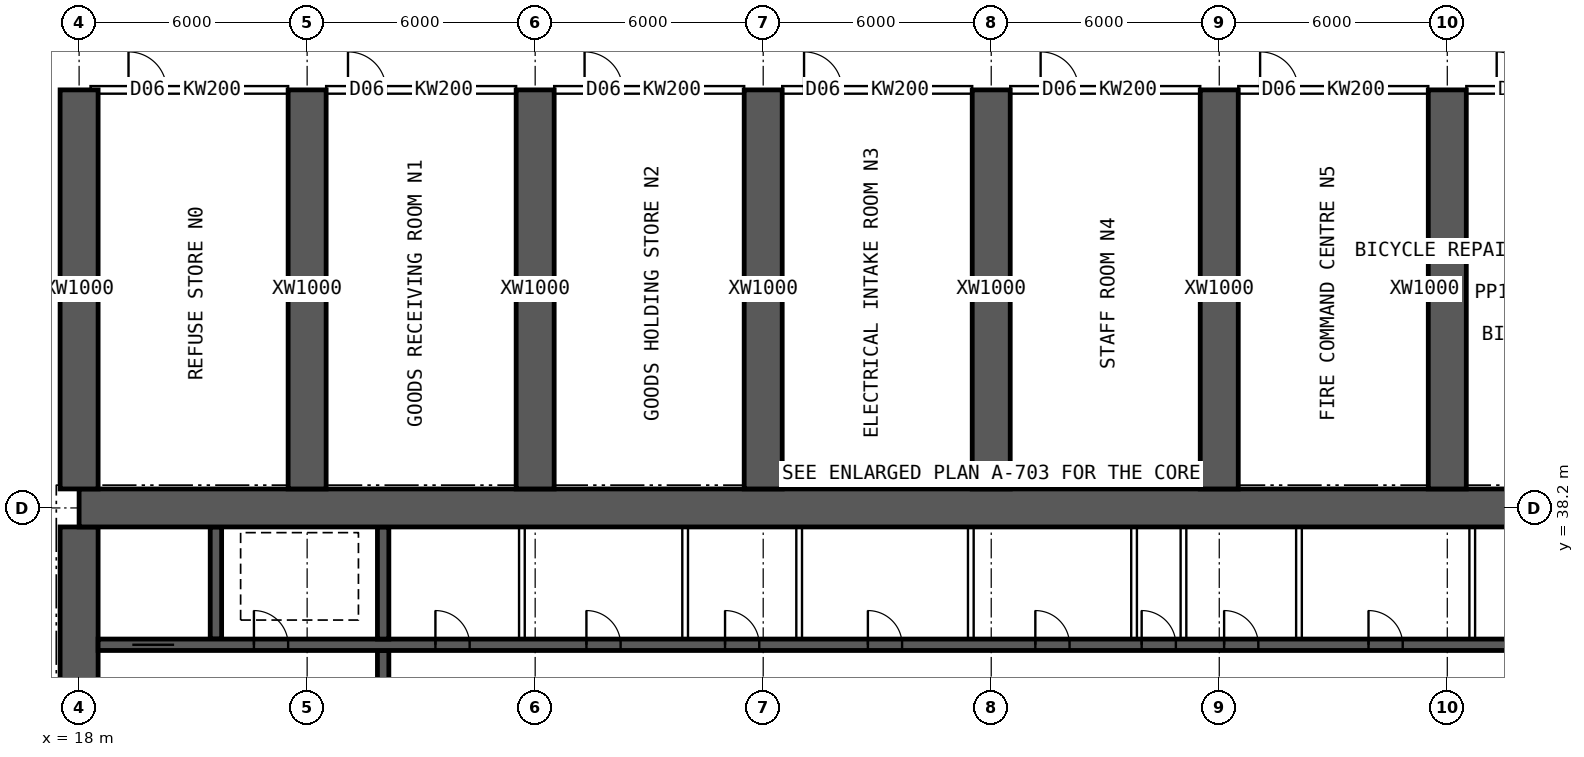
"""IFC4 building model, lengths in metres.
Left out: names, types, materials, properties, quantities, classifications, styles, units other than length and angle.
Written with IfcOpenShell. Run it as: python <this file> out.ifc"""

import sys

from ifc_helpers import new_model, si_unit, direction, frame, frame_2d, origin, place, context, subcontext, project, spatial, rectangle, extrude, element, fill, save


model = new_model("IFC4")
c1 = context("Model", 3, precision=1e-05, world=origin(), true_north=direction((0.0, 1.0)))
c2 = subcontext(c1, "Body", "Model", "MODEL_VIEW")
j1 = project(units=[si_unit("LENGTHUNIT", "METRE"), si_unit("PLANEANGLEUNIT", "RADIAN")], contexts=[c1])
p1 = place(None, origin())
s1 = spatial("IfcSite", under=j1, at=p1, CompositionType="ELEMENT")
p2 = place(p1, origin())
s2 = spatial("IfcBuilding", under=s1, at=p2, CompositionType="ELEMENT")
p3 = place(p2, origin())
s3 = spatial("IfcBuildingStorey", under=s2, at=p3, CompositionType="ELEMENT", Elevation=0.0)
p4 = place(p3, frame((18.0, 38.2, 0.0), z_axis=(0.0, 0.0, 1.0), x_axis=(1.0, 0.0, 0.0)))
e1 = element("IfcWall", 1, at=p4, inside=s3, PredefinedType="SHEAR", context=c2, shape_type="SweptSolid", body=[
    extrude(rectangle(XDim=48.0, YDim=1.0, at=frame_2d((24.0, 0.0))), origin(), (0.0, 0.0, 1.0), 6.0),
])
p5 = place(p3, frame((18.0, 26.3, 0.0), z_axis=(0.0, 0.0, 1.0), x_axis=(0.0, 1.0, 0.0)))
e2 = element("IfcWall", 2, at=p5, inside=s3, PredefinedType="SHEAR", context=c2, shape_type="SweptSolid", body=[
    extrude(rectangle(XDim=11.4, YDim=1.0, at=frame_2d((5.7, 0.0))), origin(), (0.0, 0.0, 1.0), 6.0),
])
p6 = place(p5, frame((5.0, 0.0, 0.0)))
e3 = element("IfcOpeningElement", 3, at=p6, cuts=e2, PredefinedType="OPENING", context=c2, shape_type="SweptSolid", body=[
    extrude(rectangle(XDim=1.2, YDim=2.1, at=frame_2d((0.6, 1.05))), frame((0.0, 0.51, 0.0), z_axis=(0.0, -1.0, 0.0), x_axis=(1.0, 0.0, 0.0)), (0.0, 0.0, 1.0), 1.02),
])
p7 = place(p3, frame((18.5, 34.6, 0.0), z_axis=(0.0, 0.0, 1.0), x_axis=(1.0, 0.0, 0.0)))
e4 = element("IfcWall", 4, at=p7, inside=s3, PredefinedType="SHEAR", context=c2, shape_type="SweptSolid", body=[
    extrude(rectangle(XDim=47.0, YDim=0.3, at=frame_2d((23.5, 0.0))), origin(), (0.0, 0.0, 1.0), 6.0),
])
p8 = place(p7, frame((0.9, 0.0, 0.0)))
e5 = element("IfcOpeningElement", 5, at=p8, cuts=e4, PredefinedType="OPENING", context=c2, shape_type="SweptSolid", body=[
    extrude(rectangle(XDim=1.1, YDim=2.1, at=frame_2d((0.55, 1.05))), frame((0.0, 0.16, 0.0), z_axis=(0.0, -1.0, 0.0), x_axis=(1.0, 0.0, 0.0)), (0.0, 0.0, 1.0), 0.32),
])
p9 = place(p7, frame((45.0, 0.0, 0.0)))
e6 = element("IfcOpeningElement", 6, at=p9, cuts=e4, PredefinedType="OPENING", context=c2, shape_type="SweptSolid", body=[
    extrude(rectangle(XDim=1.1, YDim=2.1, at=frame_2d((0.55, 1.05))), frame((0.0, 0.16, 0.0), z_axis=(0.0, -1.0, 0.0), x_axis=(1.0, 0.0, 0.0)), (0.0, 0.0, 1.0), 0.32),
])
p10 = place(p7, frame((4.1, 0.0, 0.0)))
e7 = element("IfcOpeningElement", 7, at=p10, cuts=e4, PredefinedType="OPENING", context=c2, shape_type="SweptSolid", body=[
    extrude(rectangle(XDim=0.9, YDim=2.1, at=frame_2d((0.45, 1.05))), frame((0.0, 0.16, 0.0), z_axis=(0.0, -1.0, 0.0), x_axis=(1.0, 0.0, 0.0)), (0.0, 0.0, 1.0), 0.32),
])
p11 = place(p7, frame((42.0, 0.0, 0.0)))
e8 = element("IfcOpeningElement", 8, at=p11, cuts=e4, PredefinedType="OPENING", context=c2, shape_type="SweptSolid", body=[
    extrude(rectangle(XDim=0.9, YDim=2.1, at=frame_2d((0.45, 1.05))), frame((0.0, 0.16, 0.0), z_axis=(0.0, -1.0, 0.0), x_axis=(1.0, 0.0, 0.0)), (0.0, 0.0, 1.0), 0.32),
])
p12 = place(p7, frame((8.875, 0.0, 0.0)))
e9 = element("IfcOpeningElement", 9, at=p12, cuts=e4, PredefinedType="OPENING", context=c2, shape_type="SweptSolid", body=[
    extrude(rectangle(XDim=0.9, YDim=2.1, at=frame_2d((0.45, 1.05))), frame((0.0, 0.16, 0.0), z_axis=(0.0, -1.0, 0.0), x_axis=(1.0, 0.0, 0.0)), (0.0, 0.0, 1.0), 0.32),
])
p13 = place(p7, frame((12.849, 0.0, 0.0)))
e10 = element("IfcOpeningElement", 10, at=p13, cuts=e4, PredefinedType="OPENING", context=c2, shape_type="SweptSolid", body=[
    extrude(rectangle(XDim=0.9, YDim=2.1, at=frame_2d((0.45, 1.05))), frame((0.0, 0.16, 0.0), z_axis=(0.0, -1.0, 0.0), x_axis=(1.0, 0.0, 0.0)), (0.0, 0.0, 1.0), 0.32),
])
p14 = place(p7, frame((16.496, 0.0, 0.0)))
e11 = element("IfcOpeningElement", 11, at=p14, cuts=e4, PredefinedType="OPENING", context=c2, shape_type="SweptSolid", body=[
    extrude(rectangle(XDim=0.9, YDim=2.1, at=frame_2d((0.45, 1.05))), frame((0.0, 0.16, 0.0), z_axis=(0.0, -1.0, 0.0), x_axis=(1.0, 0.0, 0.0)), (0.0, 0.0, 1.0), 0.32),
])
p15 = place(p7, frame((20.255, 0.0, 0.0)))
e12 = element("IfcOpeningElement", 12, at=p15, cuts=e4, PredefinedType="OPENING", context=c2, shape_type="SweptSolid", body=[
    extrude(rectangle(XDim=0.9, YDim=2.1, at=frame_2d((0.45, 1.05))), frame((0.0, 0.16, 0.0), z_axis=(0.0, -1.0, 0.0), x_axis=(1.0, 0.0, 0.0)), (0.0, 0.0, 1.0), 0.32),
])
p16 = place(p7, frame((24.661, 0.0, 0.0)))
e13 = element("IfcOpeningElement", 13, at=p16, cuts=e4, PredefinedType="OPENING", context=c2, shape_type="SweptSolid", body=[
    extrude(rectangle(XDim=0.9, YDim=2.1, at=frame_2d((0.45, 1.05))), frame((0.0, 0.16, 0.0), z_axis=(0.0, -1.0, 0.0), x_axis=(1.0, 0.0, 0.0)), (0.0, 0.0, 1.0), 0.32),
])
p17 = place(p7, frame((27.458, 0.0, 0.0)))
e14 = element("IfcOpeningElement", 14, at=p17, cuts=e4, PredefinedType="OPENING", context=c2, shape_type="SweptSolid", body=[
    extrude(rectangle(XDim=0.9, YDim=2.1, at=frame_2d((0.45, 1.05))), frame((0.0, 0.16, 0.0), z_axis=(0.0, -1.0, 0.0), x_axis=(1.0, 0.0, 0.0)), (0.0, 0.0, 1.0), 0.32),
])
p18 = place(p7, frame((29.628, 0.0, 0.0)))
e15 = element("IfcOpeningElement", 15, at=p18, cuts=e4, PredefinedType="OPENING", context=c2, shape_type="SweptSolid", body=[
    extrude(rectangle(XDim=0.9, YDim=2.1, at=frame_2d((0.45, 1.05))), frame((0.0, 0.16, 0.0), z_axis=(0.0, -1.0, 0.0), x_axis=(1.0, 0.0, 0.0)), (0.0, 0.0, 1.0), 0.32),
])
p19 = place(p7, frame((33.427, 0.0, 0.0)))
e16 = element("IfcOpeningElement", 16, at=p19, cuts=e4, PredefinedType="OPENING", context=c2, shape_type="SweptSolid", body=[
    extrude(rectangle(XDim=0.9, YDim=2.1, at=frame_2d((0.45, 1.05))), frame((0.0, 0.16, 0.0), z_axis=(0.0, -1.0, 0.0), x_axis=(1.0, 0.0, 0.0)), (0.0, 0.0, 1.0), 0.32),
])
p20 = place(p7, frame((37.378, 0.0, 0.0)))
e17 = element("IfcOpeningElement", 17, at=p20, cuts=e4, PredefinedType="OPENING", context=c2, shape_type="SweptSolid", body=[
    extrude(rectangle(XDim=0.9, YDim=2.1, at=frame_2d((0.45, 1.05))), frame((0.0, 0.16, 0.0), z_axis=(0.0, -1.0, 0.0), x_axis=(1.0, 0.0, 0.0)), (0.0, 0.0, 1.0), 0.32),
])
p21 = place(p3, frame((26.0, 30.55, 0.0), z_axis=(0.0, 0.0, 1.0), x_axis=(0.0, 1.0, 0.0)))
e18 = element("IfcWall", 18, at=p21, inside=s3, PredefinedType="SHEAR", context=c2, shape_type="SweptSolid", body=[
    extrude(rectangle(XDim=3.9, YDim=0.3, at=frame_2d((1.95, 0.0))), origin(), (0.0, 0.0, 1.0), 6.0),
])
p22 = place(p21, frame((1.4, 0.0, 0.0)))
e19 = element("IfcOpeningElement", 19, at=p22, cuts=e18, PredefinedType="OPENING", context=c2, shape_type="SweptSolid", body=[
    extrude(rectangle(XDim=1.2, YDim=2.1, at=frame_2d((0.6, 1.05))), frame((0.0, 0.16, 0.0), z_axis=(0.0, -1.0, 0.0), x_axis=(1.0, 0.0, 0.0)), (0.0, 0.0, 1.0), 0.32),
])
for number, where, z_axis, x_axis in (
    (20, (21.6, 34.75, 0.0), (0.0, 0.0, 1.0), (0.0, 1.0, 0.0)),
    (21, (26.0, 34.75, 0.0), (0.0, 0.0, 1.0), (0.0, 1.0, 0.0)),
):
    element("IfcWall", number, at=place(p3, frame(where, z_axis=z_axis, x_axis=x_axis)), inside=s3, PredefinedType="SHEAR", context=c2, shape_type="SweptSolid", body=[
        extrude(rectangle(XDim=2.95, YDim=0.3, at=frame_2d((1.475, 0.0))), origin(), (0.0, 0.0, 1.0), 6.0),
    ])
for number, where, z_axis, x_axis in (
    (22, (18.0, 38.7, 0.0), (0.0, 0.0, 1.0), (0.0, 1.0, 0.0)),
    (23, (24.0, 38.7, 0.0), (0.0, 0.0, 1.0), (0.0, 1.0, 0.0)),
    (24, (30.0, 38.7, 0.0), (0.0, 0.0, 1.0), (0.0, 1.0, 0.0)),
    (25, (36.0, 38.7, 0.0), (0.0, 0.0, 1.0), (0.0, 1.0, 0.0)),
    (26, (42.0, 38.7, 0.0), (0.0, 0.0, 1.0), (0.0, 1.0, 0.0)),
    (27, (48.0, 38.7, 0.0), (0.0, 0.0, 1.0), (0.0, 1.0, 0.0)),
    (28, (54.0, 38.7, 0.0), (0.0, 0.0, 1.0), (0.0, 1.0, 0.0)),
):
    element("IfcWall", number, at=place(p3, frame(where, z_axis=z_axis, x_axis=x_axis)), inside=s3, PredefinedType="SHEAR", context=c2, shape_type="SweptSolid", body=[
        extrude(rectangle(XDim=10.5, YDim=1.0, at=frame_2d((5.25, 0.0))), origin(), (0.0, 0.0, 1.0), 6.0),
    ])
for number, where, z_axis, x_axis in (
    (29, (29.651, 34.75, 0.0), (0.0, 0.0, 1.0), (0.0, 1.0, 0.0)),
    (30, (33.946, 34.75, 0.0), (0.0, 0.0, 1.0), (0.0, 1.0, 0.0)),
    (31, (36.946, 34.75, 0.0), (0.0, 0.0, 1.0), (0.0, 1.0, 0.0)),
    (32, (41.463, 34.75, 0.0), (0.0, 0.0, 1.0), (0.0, 1.0, 0.0)),
    (33, (45.758, 34.75, 0.0), (0.0, 0.0, 1.0), (0.0, 1.0, 0.0)),
    (34, (47.058, 34.75, 0.0), (0.0, 0.0, 1.0), (0.0, 1.0, 0.0)),
    (35, (50.098, 34.75, 0.0), (0.0, 0.0, 1.0), (0.0, 1.0, 0.0)),
    (36, (54.657, 34.75, 0.0), (0.0, 0.0, 1.0), (0.0, 1.0, 0.0)),
):
    element("IfcWall", number, at=place(p3, frame(where, z_axis=z_axis, x_axis=x_axis)), inside=s3, PredefinedType="SOLIDWALL", context=c2, shape_type="SweptSolid", body=[
        extrude(rectangle(XDim=2.95, YDim=0.15, at=frame_2d((1.475, 0.0))), origin(), (0.0, 0.0, 1.0), 5.65),
    ])
p23 = place(p3, frame((18.3, 49.2, 0.0), z_axis=(0.0, 0.0, 1.0), x_axis=(1.0, 0.0, 0.0)))
e37 = element("IfcWall", 37, at=p23, inside=s3, PredefinedType="SOLIDWALL", context=c2, shape_type="SweptSolid", body=[
    extrude(rectangle(XDim=5.2, YDim=0.2, at=frame_2d((2.6, 0.0))), origin(), (0.0, 0.0, 1.0), 5.65),
])
p24 = place(p23, frame((1.0, 0.0, 0.0)))
e38 = element("IfcOpeningElement", 38, at=p24, cuts=e37, PredefinedType="OPENING", context=c2, shape_type="SweptSolid", body=[
    extrude(rectangle(XDim=1.0, YDim=2.1, at=frame_2d((0.5, 1.05))), frame((0.0, 0.11, 0.0), z_axis=(0.0, -1.0, 0.0), x_axis=(1.0, 0.0, 0.0)), (0.0, 0.0, 1.0), 0.22),
])
p25 = place(p3, frame((24.5, 49.2, 0.0), z_axis=(0.0, 0.0, 1.0), x_axis=(1.0, 0.0, 0.0)))
e39 = element("IfcWall", 39, at=p25, inside=s3, PredefinedType="SOLIDWALL", context=c2, shape_type="SweptSolid", body=[
    extrude(rectangle(XDim=5.0, YDim=0.2, at=frame_2d((2.5, 0.0))), origin(), (0.0, 0.0, 1.0), 5.65),
])
p26 = place(p25, frame((0.575, 0.0, 0.0)))
e40 = element("IfcOpeningElement", 40, at=p26, cuts=e39, PredefinedType="OPENING", context=c2, shape_type="SweptSolid", body=[
    extrude(rectangle(XDim=1.0, YDim=2.1, at=frame_2d((0.5, 1.05))), frame((0.0, 0.11, 0.0), z_axis=(0.0, -1.0, 0.0), x_axis=(1.0, 0.0, 0.0)), (0.0, 0.0, 1.0), 0.22),
])
p27 = place(p3, frame((30.5, 49.2, 0.0), z_axis=(0.0, 0.0, 1.0), x_axis=(1.0, 0.0, 0.0)))
e41 = element("IfcWall", 41, at=p27, inside=s3, PredefinedType="SOLIDWALL", context=c2, shape_type="SweptSolid", body=[
    extrude(rectangle(XDim=5.0, YDim=0.2, at=frame_2d((2.5, 0.0))), origin(), (0.0, 0.0, 1.0), 5.65),
])
p28 = place(p27, frame((0.8, 0.0, 0.0)))
e42 = element("IfcOpeningElement", 42, at=p28, cuts=e41, PredefinedType="OPENING", context=c2, shape_type="SweptSolid", body=[
    extrude(rectangle(XDim=1.0, YDim=2.1, at=frame_2d((0.5, 1.05))), frame((0.0, 0.11, 0.0), z_axis=(0.0, -1.0, 0.0), x_axis=(1.0, 0.0, 0.0)), (0.0, 0.0, 1.0), 0.22),
])
p29 = place(p3, frame((36.5, 49.2, 0.0), z_axis=(0.0, 0.0, 1.0), x_axis=(1.0, 0.0, 0.0)))
e43 = element("IfcWall", 43, at=p29, inside=s3, PredefinedType="SOLIDWALL", context=c2, shape_type="SweptSolid", body=[
    extrude(rectangle(XDim=5.0, YDim=0.2, at=frame_2d((2.5, 0.0))), origin(), (0.0, 0.0, 1.0), 5.65),
])
p30 = place(p29, frame((0.575, 0.0, 0.0)))
e44 = element("IfcOpeningElement", 44, at=p30, cuts=e43, PredefinedType="OPENING", context=c2, shape_type="SweptSolid", body=[
    extrude(rectangle(XDim=1.0, YDim=2.1, at=frame_2d((0.5, 1.05))), frame((0.0, 0.11, 0.0), z_axis=(0.0, -1.0, 0.0), x_axis=(1.0, 0.0, 0.0)), (0.0, 0.0, 1.0), 0.22),
])
p31 = place(p3, frame((42.5, 49.2, 0.0), z_axis=(0.0, 0.0, 1.0), x_axis=(1.0, 0.0, 0.0)))
e45 = element("IfcWall", 45, at=p31, inside=s3, PredefinedType="SOLIDWALL", context=c2, shape_type="SweptSolid", body=[
    extrude(rectangle(XDim=5.0, YDim=0.2, at=frame_2d((2.5, 0.0))), origin(), (0.0, 0.0, 1.0), 5.65),
])
p32 = place(p31, frame((0.8, 0.0, 0.0)))
e46 = element("IfcOpeningElement", 46, at=p32, cuts=e45, PredefinedType="OPENING", context=c2, shape_type="SweptSolid", body=[
    extrude(rectangle(XDim=1.0, YDim=2.1, at=frame_2d((0.5, 1.05))), frame((0.0, 0.11, 0.0), z_axis=(0.0, -1.0, 0.0), x_axis=(1.0, 0.0, 0.0)), (0.0, 0.0, 1.0), 0.22),
])
p33 = place(p3, frame((48.5, 49.2, 0.0), z_axis=(0.0, 0.0, 1.0), x_axis=(1.0, 0.0, 0.0)))
e47 = element("IfcWall", 47, at=p33, inside=s3, PredefinedType="SOLIDWALL", context=c2, shape_type="SweptSolid", body=[
    extrude(rectangle(XDim=5.0, YDim=0.2, at=frame_2d((2.5, 0.0))), origin(), (0.0, 0.0, 1.0), 5.65),
])
p34 = place(p33, frame((0.575, 0.0, 0.0)))
e48 = element("IfcOpeningElement", 48, at=p34, cuts=e47, PredefinedType="OPENING", context=c2, shape_type="SweptSolid", body=[
    extrude(rectangle(XDim=1.0, YDim=2.1, at=frame_2d((0.5, 1.05))), frame((0.0, 0.11, 0.0), z_axis=(0.0, -1.0, 0.0), x_axis=(1.0, 0.0, 0.0)), (0.0, 0.0, 1.0), 0.22),
])
p35 = place(p3, frame((54.5, 49.2, 0.0), z_axis=(0.0, 0.0, 1.0), x_axis=(1.0, 0.0, 0.0)))
e49 = element("IfcWall", 49, at=p35, inside=s3, PredefinedType="SOLIDWALL", context=c2, shape_type="SweptSolid", body=[
    extrude(rectangle(XDim=5.0, YDim=0.2, at=frame_2d((2.5, 0.0))), origin(), (0.0, 0.0, 1.0), 5.65),
])
p36 = place(p35, frame((0.8, 0.0, 0.0)))
e50 = element("IfcOpeningElement", 50, at=p36, cuts=e49, PredefinedType="OPENING", context=c2, shape_type="SweptSolid", body=[
    extrude(rectangle(XDim=1.0, YDim=2.1, at=frame_2d((0.5, 1.05))), frame((0.0, 0.11, 0.0), z_axis=(0.0, -1.0, 0.0), x_axis=(1.0, 0.0, 0.0)), (0.0, 0.0, 1.0), 0.22),
])
p37 = place(p8, origin())
e51 = element("IfcDoor", 51, at=p37, inside=s3, OperationType="DOUBLE_DOOR_SLIDING", PredefinedType="DOOR", context=c2, shape_type="SweptSolid", body=[
    extrude(rectangle(XDim=1.1, YDim=2.1, at=frame_2d((0.55, 1.05))), frame((0.0, 0.025, 0.0), z_axis=(0.0, -1.0, 0.0), x_axis=(1.0, 0.0, 0.0)), (0.0, 0.0, 1.0), 0.05),
])
fill(e5, e51)
p38 = place(p10, origin())
e52 = element("IfcDoor", 52, at=p38, inside=s3, OperationType="SINGLE_SWING_LEFT", PredefinedType="DOOR", context=c2, shape_type="SweptSolid", body=[
    extrude(rectangle(XDim=0.9, YDim=2.1, at=frame_2d((0.45, 1.05))), frame((0.0, 0.025, 0.0), z_axis=(0.0, -1.0, 0.0), x_axis=(1.0, 0.0, 0.0)), (0.0, 0.0, 1.0), 0.05),
])
fill(e7, e52)
p39 = place(p12, origin())
e53 = element("IfcDoor", 53, at=p39, inside=s3, OperationType="SINGLE_SWING_LEFT", PredefinedType="DOOR", context=c2, shape_type="SweptSolid", body=[
    extrude(rectangle(XDim=0.9, YDim=2.1, at=frame_2d((0.45, 1.05))), frame((0.0, 0.025, 0.0), z_axis=(0.0, -1.0, 0.0), x_axis=(1.0, 0.0, 0.0)), (0.0, 0.0, 1.0), 0.05),
])
fill(e9, e53)
p40 = place(p13, origin())
e54 = element("IfcDoor", 54, at=p40, inside=s3, OperationType="SINGLE_SWING_LEFT", PredefinedType="DOOR", context=c2, shape_type="SweptSolid", body=[
    extrude(rectangle(XDim=0.9, YDim=2.1, at=frame_2d((0.45, 1.05))), frame((0.0, 0.025, 0.0), z_axis=(0.0, -1.0, 0.0), x_axis=(1.0, 0.0, 0.0)), (0.0, 0.0, 1.0), 0.05),
])
fill(e10, e54)
p41 = place(p14, origin())
e55 = element("IfcDoor", 55, at=p41, inside=s3, OperationType="SINGLE_SWING_LEFT", PredefinedType="DOOR", context=c2, shape_type="SweptSolid", body=[
    extrude(rectangle(XDim=0.9, YDim=2.1, at=frame_2d((0.45, 1.05))), frame((0.0, 0.025, 0.0), z_axis=(0.0, -1.0, 0.0), x_axis=(1.0, 0.0, 0.0)), (0.0, 0.0, 1.0), 0.05),
])
fill(e11, e55)
p42 = place(p15, origin())
e56 = element("IfcDoor", 56, at=p42, inside=s3, OperationType="SINGLE_SWING_LEFT", PredefinedType="DOOR", context=c2, shape_type="SweptSolid", body=[
    extrude(rectangle(XDim=0.9, YDim=2.1, at=frame_2d((0.45, 1.05))), frame((0.0, 0.025, 0.0), z_axis=(0.0, -1.0, 0.0), x_axis=(1.0, 0.0, 0.0)), (0.0, 0.0, 1.0), 0.05),
])
fill(e12, e56)
p43 = place(p16, origin())
e57 = element("IfcDoor", 57, at=p43, inside=s3, OperationType="SINGLE_SWING_LEFT", PredefinedType="DOOR", context=c2, shape_type="SweptSolid", body=[
    extrude(rectangle(XDim=0.9, YDim=2.1, at=frame_2d((0.45, 1.05))), frame((0.0, 0.025, 0.0), z_axis=(0.0, -1.0, 0.0), x_axis=(1.0, 0.0, 0.0)), (0.0, 0.0, 1.0), 0.05),
])
fill(e13, e57)
p44 = place(p17, origin())
e58 = element("IfcDoor", 58, at=p44, inside=s3, OperationType="SINGLE_SWING_LEFT", PredefinedType="DOOR", context=c2, shape_type="SweptSolid", body=[
    extrude(rectangle(XDim=0.9, YDim=2.1, at=frame_2d((0.45, 1.05))), frame((0.0, 0.025, 0.0), z_axis=(0.0, -1.0, 0.0), x_axis=(1.0, 0.0, 0.0)), (0.0, 0.0, 1.0), 0.05),
])
fill(e14, e58)
p45 = place(p18, origin())
e59 = element("IfcDoor", 59, at=p45, inside=s3, OperationType="SINGLE_SWING_LEFT", PredefinedType="DOOR", context=c2, shape_type="SweptSolid", body=[
    extrude(rectangle(XDim=0.9, YDim=2.1, at=frame_2d((0.45, 1.05))), frame((0.0, 0.025, 0.0), z_axis=(0.0, -1.0, 0.0), x_axis=(1.0, 0.0, 0.0)), (0.0, 0.0, 1.0), 0.05),
])
fill(e15, e59)
p46 = place(p19, origin())
e60 = element("IfcDoor", 60, at=p46, inside=s3, OperationType="SINGLE_SWING_LEFT", PredefinedType="DOOR", context=c2, shape_type="SweptSolid", body=[
    extrude(rectangle(XDim=0.9, YDim=2.1, at=frame_2d((0.45, 1.05))), frame((0.0, 0.025, 0.0), z_axis=(0.0, -1.0, 0.0), x_axis=(1.0, 0.0, 0.0)), (0.0, 0.0, 1.0), 0.05),
])
fill(e16, e60)
p47 = place(p24, origin())
e61 = element("IfcDoor", 61, at=p47, inside=s3, OperationType="SINGLE_SWING_LEFT", PredefinedType="DOOR", context=c2, shape_type="SweptSolid", body=[
    extrude(rectangle(XDim=1.0, YDim=2.1, at=frame_2d((0.5, 1.05))), frame((0.0, 0.025, 0.0), z_axis=(0.0, -1.0, 0.0), x_axis=(1.0, 0.0, 0.0)), (0.0, 0.0, 1.0), 0.05),
])
fill(e38, e61)
p48 = place(p26, origin())
e62 = element("IfcDoor", 62, at=p48, inside=s3, OperationType="SINGLE_SWING_LEFT", PredefinedType="DOOR", context=c2, shape_type="SweptSolid", body=[
    extrude(rectangle(XDim=1.0, YDim=2.1, at=frame_2d((0.5, 1.05))), frame((0.0, 0.025, 0.0), z_axis=(0.0, -1.0, 0.0), x_axis=(1.0, 0.0, 0.0)), (0.0, 0.0, 1.0), 0.05),
])
fill(e40, e62)
p49 = place(p28, origin())
e63 = element("IfcDoor", 63, at=p49, inside=s3, OperationType="SINGLE_SWING_LEFT", PredefinedType="DOOR", context=c2, shape_type="SweptSolid", body=[
    extrude(rectangle(XDim=1.0, YDim=2.1, at=frame_2d((0.5, 1.05))), frame((0.0, 0.025, 0.0), z_axis=(0.0, -1.0, 0.0), x_axis=(1.0, 0.0, 0.0)), (0.0, 0.0, 1.0), 0.05),
])
fill(e42, e63)
p50 = place(p30, origin())
e64 = element("IfcDoor", 64, at=p50, inside=s3, OperationType="SINGLE_SWING_LEFT", PredefinedType="DOOR", context=c2, shape_type="SweptSolid", body=[
    extrude(rectangle(XDim=1.0, YDim=2.1, at=frame_2d((0.5, 1.05))), frame((0.0, 0.025, 0.0), z_axis=(0.0, -1.0, 0.0), x_axis=(1.0, 0.0, 0.0)), (0.0, 0.0, 1.0), 0.05),
])
fill(e44, e64)
p51 = place(p32, origin())
e65 = element("IfcDoor", 65, at=p51, inside=s3, OperationType="SINGLE_SWING_LEFT", PredefinedType="DOOR", context=c2, shape_type="SweptSolid", body=[
    extrude(rectangle(XDim=1.0, YDim=2.1, at=frame_2d((0.5, 1.05))), frame((0.0, 0.025, 0.0), z_axis=(0.0, -1.0, 0.0), x_axis=(1.0, 0.0, 0.0)), (0.0, 0.0, 1.0), 0.05),
])
fill(e46, e65)
p52 = place(p34, origin())
e66 = element("IfcDoor", 66, at=p52, inside=s3, OperationType="SINGLE_SWING_LEFT", PredefinedType="DOOR", context=c2, shape_type="SweptSolid", body=[
    extrude(rectangle(XDim=1.0, YDim=2.1, at=frame_2d((0.5, 1.05))), frame((0.0, 0.025, 0.0), z_axis=(0.0, -1.0, 0.0), x_axis=(1.0, 0.0, 0.0)), (0.0, 0.0, 1.0), 0.05),
])
fill(e48, e66)
p53 = place(p36, origin())
e67 = element("IfcDoor", 67, at=p53, inside=s3, OperationType="SINGLE_SWING_LEFT", PredefinedType="DOOR", context=c2, shape_type="SweptSolid", body=[
    extrude(rectangle(XDim=1.0, YDim=2.1, at=frame_2d((0.5, 1.05))), frame((0.0, 0.025, 0.0), z_axis=(0.0, -1.0, 0.0), x_axis=(1.0, 0.0, 0.0)), (0.0, 0.0, 1.0), 0.05),
])
fill(e50, e67)
save(model, sys.argv[1])
